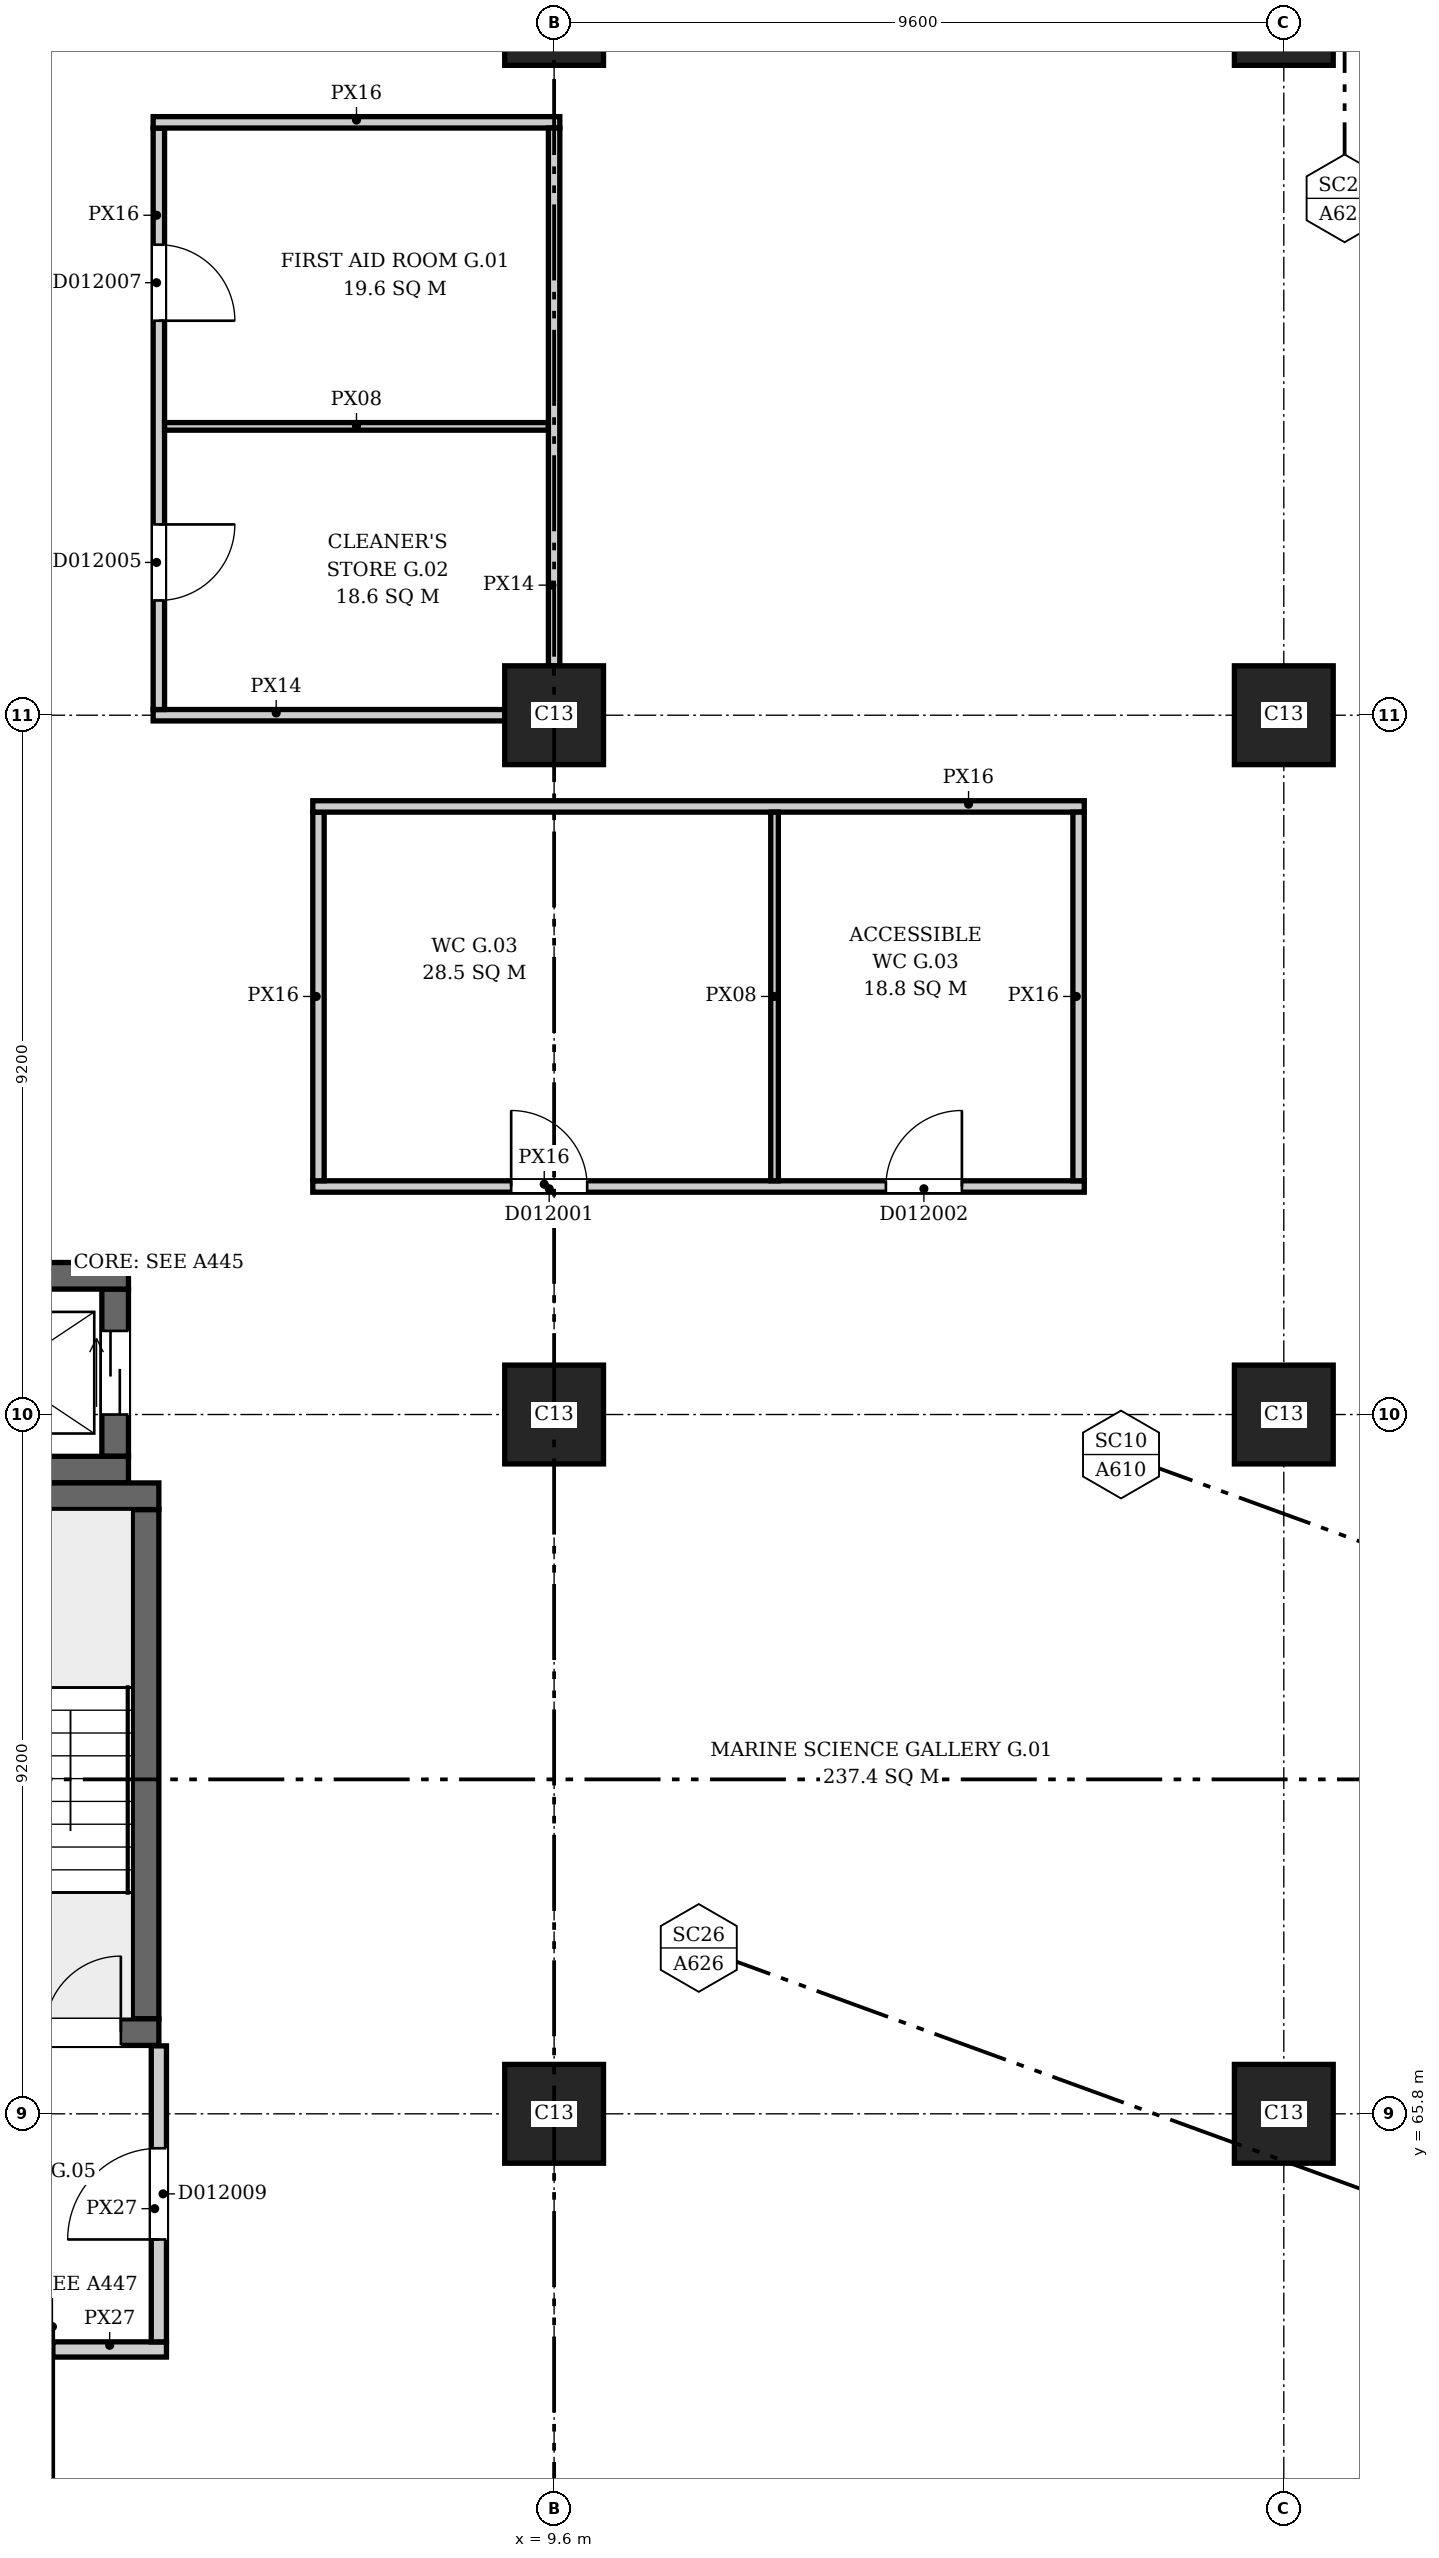
"""IFC4 building model, lengths in metres.
Left out: names, types, materials, properties, quantities, classifications, styles, units other than length and angle.
Written with IfcOpenShell. Run it as: python <this file> out.ifc"""

import sys

from ifc_helpers import new_model, si_unit, direction, frame, frame_2d, origin, origin_2d, place, context, subcontext, project, spatial, rectangle, extrude, element, fill, save


model = new_model("IFC4")
c1 = context("Model", 3, precision=1e-05, world=origin(), true_north=direction((0.0, 1.0)))
c2 = subcontext(c1, "Body", "Model", "MODEL_VIEW")
j1 = project(units=[si_unit("LENGTHUNIT", "METRE"), si_unit("PLANEANGLEUNIT", "RADIAN")], contexts=[c1])
p1 = place(None, origin())
s1 = spatial("IfcSite", under=j1, at=p1, CompositionType="ELEMENT")
p2 = place(p1, origin())
s2 = spatial("IfcBuilding", under=s1, at=p2, CompositionType="ELEMENT")
p3 = place(p2, origin())
s3 = spatial("IfcBuildingStorey", under=s2, at=p3, CompositionType="ELEMENT", Elevation=0.0)
p4 = place(p3, frame((0.2, 66.875, 0.0), z_axis=(0.0, 0.0, 1.0), x_axis=(1.0, 0.0, 0.0)))
e1 = element("IfcWall", 1, at=p4, inside=s3, PredefinedType="SHEAR", context=c2, shape_type="SweptSolid", body=[
    extrude(rectangle(XDim=4.2, YDim=0.35, at=frame_2d((2.1, 0.0))), origin(), (0.0, 0.0, 1.0), 6.5),
])
p5 = place(p4, frame((0.5, 0.0, 0.0)))
e2 = element("IfcOpeningElement", 2, at=p5, cuts=e1, PredefinedType="OPENING", context=c2, shape_type="SweptSolid", body=[
    extrude(rectangle(XDim=1.0, YDim=2.1, at=frame_2d((0.5, 1.05))), frame((0.0, 0.185, 0.0), z_axis=(0.0, -1.0, 0.0), x_axis=(1.0, 0.0, 0.0)), (0.0, 0.0, 1.0), 0.37),
])
p6 = place(p4, frame((2.7, 0.0, 0.0)))
e3 = element("IfcOpeningElement", 3, at=p6, cuts=e1, PredefinedType="OPENING", context=c2, shape_type="SweptSolid", body=[
    extrude(rectangle(XDim=1.0, YDim=2.1, at=frame_2d((0.5, 1.05))), frame((0.0, 0.185, 0.0), z_axis=(0.0, -1.0, 0.0), x_axis=(1.0, 0.0, 0.0)), (0.0, 0.0, 1.0), 0.37),
])
p7 = place(p3, frame((0.2, 73.925, 0.0), z_axis=(0.0, 0.0, 1.0), x_axis=(1.0, 0.0, 0.0)))
e4 = element("IfcWall", 4, at=p7, inside=s3, PredefinedType="SHEAR", context=c2, shape_type="SweptSolid", body=[
    extrude(rectangle(XDim=4.2, YDim=0.35, at=frame_2d((2.1, 0.0))), origin(), (0.0, 0.0, 1.0), 6.5),
])
p8 = place(p3, frame((4.225, 67.05, 0.0), z_axis=(0.0, 0.0, 1.0), x_axis=(0.0, 1.0, 0.0)))
e5 = element("IfcWall", 5, at=p8, inside=s3, PredefinedType="SHEAR", context=c2, shape_type="SweptSolid", body=[
    extrude(rectangle(XDim=6.7, YDim=0.35, at=frame_2d((3.35, 0.0))), origin(), (0.0, 0.0, 1.0), 6.5),
])
for number, where, z_axis, x_axis in (
    (6, (0.2, 74.275, 0.0), (0.0, 0.0, 1.0), (1.0, 0.0, 0.0)),
    (7, (0.2, 76.825, 0.0), (0.0, 0.0, 1.0), (1.0, 0.0, 0.0)),
):
    element("IfcWall", number, at=place(p3, frame(where, z_axis=z_axis, x_axis=x_axis)), inside=s3, PredefinedType="SHEAR", context=c2, shape_type="SweptSolid", body=[
        extrude(rectangle(XDim=3.8, YDim=0.35, at=frame_2d((1.9, 0.0))), origin(), (0.0, 0.0, 1.0), 6.5),
    ])
p9 = place(p3, frame((3.825, 74.45, 0.0), z_axis=(0.0, 0.0, 1.0), x_axis=(0.0, 1.0, 0.0)))
e8 = element("IfcWall", 8, at=p9, inside=s3, PredefinedType="SHEAR", context=c2, shape_type="SweptSolid", body=[
    extrude(rectangle(XDim=2.2, YDim=0.35, at=frame_2d((1.1, 0.0))), origin(), (0.0, 0.0, 1.0), 6.5),
])
p10 = place(p9, frame((0.55, 0.0, 0.0)))
e9 = element("IfcOpeningElement", 9, at=p10, cuts=e8, PredefinedType="OPENING", context=c2, shape_type="SweptSolid", body=[
    extrude(rectangle(XDim=1.1, YDim=2.1, at=frame_2d((0.55, 1.05))), frame((0.0, 0.185, 0.0), z_axis=(0.0, -1.0, 0.0), x_axis=(1.0, 0.0, 0.0)), (0.0, 0.0, 1.0), 0.37),
])
for number, where, z_axis, x_axis in (
    (10, (9.6, 65.8, 0.0), (0.0, 0.0, 1.0), (1.0, 0.0, 0.0)),
    (11, (19.2, 65.8, 0.0), (0.0, 0.0, 1.0), (1.0, 0.0, 0.0)),
    (12, (9.6, 75.0, 0.0), (0.0, 0.0, 1.0), (1.0, 0.0, 0.0)),
    (13, (19.2, 75.0, 0.0), (0.0, 0.0, 1.0), (1.0, 0.0, 0.0)),
    (14, (9.6, 84.2, 0.0), (0.0, 0.0, 1.0), (1.0, 0.0, 0.0)),
    (15, (19.2, 84.2, 0.0), (0.0, 0.0, 1.0), (1.0, 0.0, 0.0)),
    (16, (9.6, 93.4, 0.0), (0.0, 0.0, 1.0), (1.0, 0.0, 0.0)),
    (17, (19.2, 93.4, 0.0), (0.0, 0.0, 1.0), (1.0, 0.0, 0.0)),
):
    element("IfcColumn", number, at=place(p3, frame(where, z_axis=z_axis, x_axis=x_axis)), inside=s3, PredefinedType="COLUMN", context=c2, shape_type="SweptSolid", body=[
        extrude(rectangle(XDim=1.3, YDim=1.3, at=origin_2d()), origin(), (0.0, 0.0, 1.0), 6.5),
    ])
p11 = place(p3, frame((3.006, 62.7, 0.0), z_axis=(0.0, 0.0, 1.0), x_axis=(1.0, 0.0, 0.0)))
e18 = element("IfcWall", 18, at=p11, inside=s3, PredefinedType="PARTITIONING", context=c2, shape_type="SweptSolid", body=[
    extrude(rectangle(XDim=1.494, YDim=0.2, at=frame_2d((0.747, 0.0))), origin(), (0.0, 0.0, 1.0), 6.05),
])
p12 = place(p3, frame((4.4, 62.8, 0.0), z_axis=(0.0, 0.0, 1.0), x_axis=(0.0, 1.0, 0.0)))
e19 = element("IfcWall", 19, at=p12, inside=s3, PredefinedType="PARTITIONING", context=c2, shape_type="SweptSolid", body=[
    extrude(rectangle(XDim=3.894, YDim=0.2, at=frame_2d((1.947, 0.0))), origin(), (0.0, 0.0, 1.0), 6.05),
])
p13 = place(p12, frame((1.347, 0.0, 0.0)))
e20 = element("IfcOpeningElement", 20, at=p13, cuts=e19, PredefinedType="OPENING", context=c2, shape_type="SweptSolid", body=[
    extrude(rectangle(XDim=1.2, YDim=2.1, at=frame_2d((0.6, 1.05))), frame((0.0, 0.11, 0.0), z_axis=(0.0, -1.0, 0.0), x_axis=(1.0, 0.0, 0.0)), (0.0, 0.0, 1.0), 0.22),
])
p14 = place(p3, frame((4.325, 84.2, 0.0), z_axis=(0.0, 0.0, 1.0), x_axis=(1.0, 0.0, 0.0)))
e21 = element("IfcWall", 21, at=p14, inside=s3, PredefinedType="PARTITIONING", context=c2, shape_type="SweptSolid", body=[
    extrude(rectangle(XDim=4.625, YDim=0.15, at=frame_2d((2.312, 0.0))), origin(), (0.0, 0.0, 1.0), 5.65),
])
p15 = place(p3, frame((4.4, 84.275, 0.0), z_axis=(0.0, 0.0, 1.0), x_axis=(0.0, 1.0, 0.0)))
e22 = element("IfcWall", 22, at=p15, inside=s3, PredefinedType="PARTITIONING", context=c2, shape_type="SweptSolid", body=[
    extrude(rectangle(XDim=7.65, YDim=0.15, at=frame_2d((3.825, 0.0))), origin(), (0.0, 0.0, 1.0), 6.05),
])
p16 = place(p15, frame((1.435, 0.0, 0.0)))
e23 = element("IfcOpeningElement", 23, at=p16, cuts=e22, PredefinedType="OPENING", context=c2, shape_type="SweptSolid", body=[
    extrude(rectangle(XDim=1.0, YDim=2.1, at=frame_2d((0.5, 1.05))), frame((0.0, 0.085, 0.0), z_axis=(0.0, -1.0, 0.0), x_axis=(1.0, 0.0, 0.0)), (0.0, 0.0, 1.0), 0.17),
])
p17 = place(p15, frame((5.115, 0.0, 0.0)))
e24 = element("IfcOpeningElement", 24, at=p17, cuts=e22, PredefinedType="OPENING", context=c2, shape_type="SweptSolid", body=[
    extrude(rectangle(XDim=1.0, YDim=2.1, at=frame_2d((0.5, 1.05))), frame((0.0, 0.085, 0.0), z_axis=(0.0, -1.0, 0.0), x_axis=(1.0, 0.0, 0.0)), (0.0, 0.0, 1.0), 0.17),
])
p18 = place(p3, frame((4.325, 92.0, 0.0), z_axis=(0.0, 0.0, 1.0), x_axis=(1.0, 0.0, 0.0)))
e25 = element("IfcWall", 25, at=p18, inside=s3, PredefinedType="PARTITIONING", context=c2, shape_type="SweptSolid", body=[
    extrude(rectangle(XDim=5.35, YDim=0.15, at=frame_2d((2.675, 0.0))), origin(), (0.0, 0.0, 1.0), 6.05),
])
p19 = place(p3, frame((4.475, 88.0, 0.0), z_axis=(0.0, 0.0, 1.0), x_axis=(1.0, 0.0, 0.0)))
e26 = element("IfcWall", 26, at=p19, inside=s3, PredefinedType="PARTITIONING", context=c2, shape_type="SweptSolid", body=[
    extrude(rectangle(XDim=5.05, YDim=0.1, at=frame_2d((2.525, 0.0))), origin(), (0.0, 0.0, 1.0), 6.05),
])
p20 = place(p3, frame((6.425, 78.0, 0.0), z_axis=(0.0, 0.0, 1.0), x_axis=(1.0, 0.0, 0.0)))
e27 = element("IfcWall", 27, at=p20, inside=s3, PredefinedType="PARTITIONING", context=c2, shape_type="SweptSolid", body=[
    extrude(rectangle(XDim=10.15, YDim=0.15, at=frame_2d((5.075, 0.0))), origin(), (0.0, 0.0, 1.0), 6.05),
])
p21 = place(p20, frame((2.61, 0.0, 0.0)))
e28 = element("IfcOpeningElement", 28, at=p21, cuts=e27, PredefinedType="OPENING", context=c2, shape_type="SweptSolid", body=[
    extrude(rectangle(XDim=1.0, YDim=2.1, at=frame_2d((0.5, 1.05))), frame((0.0, 0.085, 0.0), z_axis=(0.0, -1.0, 0.0), x_axis=(1.0, 0.0, 0.0)), (0.0, 0.0, 1.0), 0.17),
])
p22 = place(p20, frame((7.54, 0.0, 0.0)))
e29 = element("IfcOpeningElement", 29, at=p22, cuts=e27, PredefinedType="OPENING", context=c2, shape_type="SweptSolid", body=[
    extrude(rectangle(XDim=1.0, YDim=2.1, at=frame_2d((0.5, 1.05))), frame((0.0, 0.085, 0.0), z_axis=(0.0, -1.0, 0.0), x_axis=(1.0, 0.0, 0.0)), (0.0, 0.0, 1.0), 0.17),
])
p23 = place(p3, frame((6.5, 78.075, 0.0), z_axis=(0.0, 0.0, 1.0), x_axis=(0.0, 1.0, 0.0)))
e30 = element("IfcWall", 30, at=p23, inside=s3, PredefinedType="PARTITIONING", context=c2, shape_type="SweptSolid", body=[
    extrude(rectangle(XDim=4.85, YDim=0.15, at=frame_2d((2.425, 0.0))), origin(), (0.0, 0.0, 1.0), 6.05),
])
p24 = place(p3, frame((6.425, 83.0, 0.0), z_axis=(0.0, 0.0, 1.0), x_axis=(1.0, 0.0, 0.0)))
e31 = element("IfcWall", 31, at=p24, inside=s3, PredefinedType="PARTITIONING", context=c2, shape_type="SweptSolid", body=[
    extrude(rectangle(XDim=10.15, YDim=0.15, at=frame_2d((5.075, 0.0))), origin(), (0.0, 0.0, 1.0), 6.05),
])
p25 = place(p3, frame((9.6, 84.85, 0.0), z_axis=(0.0, 0.0, 1.0), x_axis=(0.0, 1.0, 0.0)))
e32 = element("IfcWall", 32, at=p25, inside=s3, PredefinedType="PARTITIONING", context=c2, shape_type="SweptSolid", body=[
    extrude(rectangle(XDim=7.075, YDim=0.15, at=frame_2d((3.538, 0.0))), origin(), (0.0, 0.0, 1.0), 5.65),
])
p26 = place(p3, frame((12.5, 78.075, 0.0), z_axis=(0.0, 0.0, 1.0), x_axis=(0.0, 1.0, 0.0)))
e33 = element("IfcWall", 33, at=p26, inside=s3, PredefinedType="PARTITIONING", context=c2, shape_type="SweptSolid", body=[
    extrude(rectangle(XDim=4.85, YDim=0.1, at=frame_2d((2.425, 0.0))), origin(), (0.0, 0.0, 1.0), 6.05),
])
p27 = place(p3, frame((16.5, 78.075, 0.0), z_axis=(0.0, 0.0, 1.0), x_axis=(0.0, 1.0, 0.0)))
e34 = element("IfcWall", 34, at=p27, inside=s3, PredefinedType="PARTITIONING", context=c2, shape_type="SweptSolid", body=[
    extrude(rectangle(XDim=4.85, YDim=0.15, at=frame_2d((2.425, 0.0))), origin(), (0.0, 0.0, 1.0), 6.05),
])
p28 = place(p6, origin())
e35 = element("IfcDoor", 35, at=p28, inside=s3, OperationType="SINGLE_SWING_RIGHT", PredefinedType="DOOR", context=c2, shape_type="SweptSolid", body=[
    extrude(rectangle(XDim=1.0, YDim=2.1, at=frame_2d((0.5, 1.05))), frame((0.0, 0.025, 0.0), z_axis=(0.0, -1.0, 0.0), x_axis=(1.0, 0.0, 0.0)), (0.0, 0.0, 1.0), 0.05),
])
fill(e3, e35)
p29 = place(p10, origin())
e36 = element("IfcDoor", 36, at=p29, inside=s3, OperationType="DOUBLE_DOOR_SLIDING", PredefinedType="DOOR", context=c2, shape_type="SweptSolid", body=[
    extrude(rectangle(XDim=1.1, YDim=2.1, at=frame_2d((0.55, 1.05))), frame((0.0, 0.025, 0.0), z_axis=(0.0, -1.0, 0.0), x_axis=(1.0, 0.0, 0.0)), (0.0, 0.0, 1.0), 0.05),
])
fill(e9, e36)
p30 = place(p21, origin())
e37 = element("IfcDoor", 37, at=p30, inside=s3, OperationType="SINGLE_SWING_LEFT", PredefinedType="DOOR", context=c2, shape_type="SweptSolid", body=[
    extrude(rectangle(XDim=1.0, YDim=2.1, at=frame_2d((0.5, 1.05))), frame((0.0, 0.025, 0.0), z_axis=(0.0, -1.0, 0.0), x_axis=(1.0, 0.0, 0.0)), (0.0, 0.0, 1.0), 0.05),
])
fill(e28, e37)
p31 = place(p22, origin())
e38 = element("IfcDoor", 38, at=p31, inside=s3, OperationType="SINGLE_SWING_RIGHT", PredefinedType="DOOR", context=c2, shape_type="SweptSolid", body=[
    extrude(rectangle(XDim=1.0, YDim=2.1, at=frame_2d((0.5, 1.05))), frame((0.0, 0.025, 0.0), z_axis=(0.0, -1.0, 0.0), x_axis=(1.0, 0.0, 0.0)), (0.0, 0.0, 1.0), 0.05),
])
fill(e29, e38)
p32 = place(p16, origin())
e39 = element("IfcDoor", 39, at=p32, inside=s3, OperationType="SINGLE_SWING_RIGHT", PredefinedType="DOOR", context=c2, shape_type="SweptSolid", body=[
    extrude(rectangle(XDim=1.0, YDim=2.1, at=frame_2d((0.5, 1.05))), frame((0.0, 0.025, 0.0), z_axis=(0.0, -1.0, 0.0), x_axis=(1.0, 0.0, 0.0)), (0.0, 0.0, 1.0), 0.05),
])
fill(e23, e39)
p33 = place(p17, origin())
e40 = element("IfcDoor", 40, at=p33, inside=s3, OperationType="SINGLE_SWING_LEFT", PredefinedType="DOOR", context=c2, shape_type="SweptSolid", body=[
    extrude(rectangle(XDim=1.0, YDim=2.1, at=frame_2d((0.5, 1.05))), frame((0.0, 0.025, 0.0), z_axis=(0.0, -1.0, 0.0), x_axis=(1.0, 0.0, 0.0)), (0.0, 0.0, 1.0), 0.05),
])
fill(e24, e40)
p34 = place(p13, origin())
e41 = element("IfcDoor", 41, at=p34, inside=s3, OperationType="SINGLE_SWING_LEFT", PredefinedType="DOOR", context=c2, shape_type="SweptSolid", body=[
    extrude(rectangle(XDim=1.2, YDim=2.1, at=frame_2d((0.6, 1.05))), frame((0.0, 0.025, 0.0), z_axis=(0.0, -1.0, 0.0), x_axis=(1.0, 0.0, 0.0)), (0.0, 0.0, 1.0), 0.05),
])
fill(e20, e41)
save(model, sys.argv[1])
